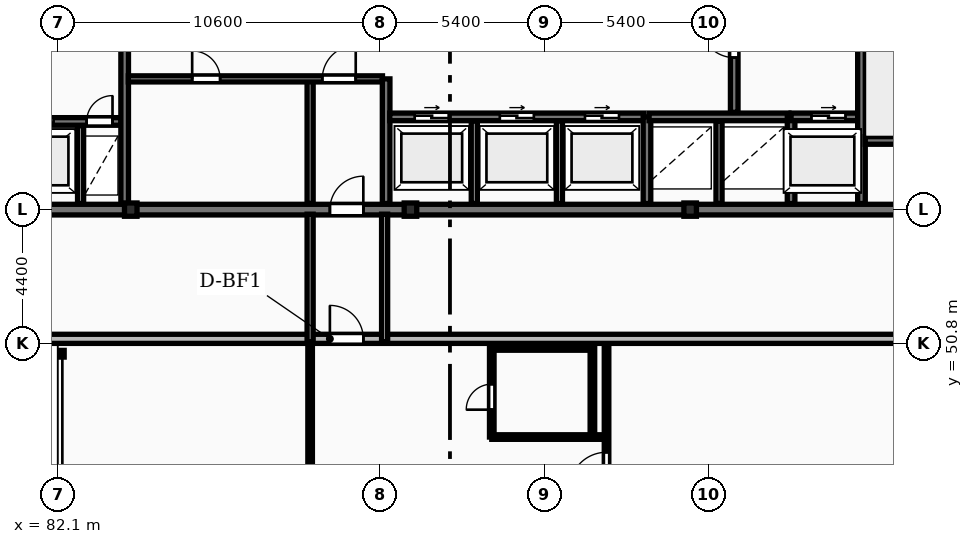
"""IFC4 building model, lengths in metres.
Left out: names, types, materials, properties, quantities, classifications, styles, units other than length and angle.
Written with IfcOpenShell. Run it as: python <this file> out.ifc"""

import sys

from ifc_helpers import new_model, si_unit, direction, frame, frame_2d, origin, origin_2d, place, context, subcontext, project, spatial, rectangle, i_section, extrude, element, fill, save


model = new_model("IFC4")
c1 = context("Model", 3, precision=1e-05, world=origin(), true_north=direction((0.0, 1.0)))
c2 = subcontext(c1, "Body", "Model", "MODEL_VIEW")
j1 = project(units=[si_unit("LENGTHUNIT", "METRE"), si_unit("PLANEANGLEUNIT", "RADIAN")], contexts=[c1])
p1 = place(None, origin())
s1 = spatial("IfcSite", under=j1, at=p1, CompositionType="ELEMENT")
p2 = place(p1, origin())
s2 = spatial("IfcBuilding", under=s1, at=p2, CompositionType="ELEMENT")
p3 = place(p2, frame((0.0, 0.0, 146.5)))
s3 = spatial("IfcBuildingStorey", under=s2, at=p3, CompositionType="ELEMENT", Elevation=146.5)
for number, where, z_axis, x_axis in (
    (1, (84.5, 55.2, 0.0), (0.0, 0.0, 1.0), (1.0, 0.0, 0.0)),
    (2, (93.7, 55.2, 0.0), (0.0, 0.0, 1.0), (1.0, 0.0, 0.0)),
    (3, (102.9, 55.2, 0.0), (0.0, 0.0, 1.0), (1.0, 0.0, 0.0)),
):
    element("IfcColumn", number, at=place(p3, frame(where, z_axis=z_axis, x_axis=x_axis)), inside=s3, PredefinedType="COLUMN", context=c2, shape_type="SweptSolid", body=[
        extrude(i_section(OverallWidth=0.412, OverallDepth=0.437, WebThickness=0.036, FlangeThickness=0.052, FilletRadius=0.015, at=origin_2d()), origin(), (0.0, 0.0, 1.0), 3.6),
    ])
p4 = place(p3, frame((57.6, 50.95, 0.0), z_axis=(0.0, 0.0, 1.0), x_axis=(1.0, 0.0, 0.0)))
e4 = element("IfcWall", 4, at=p4, inside=s3, PredefinedType="STANDARD", context=c2, shape_type="SweptSolid", body=[
    extrude(rectangle(XDim=73.0, YDim=0.3, at=frame_2d((36.5, 0.0))), origin(), (0.0, 0.0, 1.0), 3.31),
])
p5 = place(p4, frame((15.225, 0.0, 0.85)))
e5 = element("IfcOpeningElement", 5, at=p5, cuts=e4, PredefinedType="OPENING", context=c2, shape_type="SweptSolid", body=[
    extrude(rectangle(XDim=1.8, YDim=1.8, at=frame_2d((0.9, 0.9))), frame((0.0, 0.16, 0.0), z_axis=(0.0, -1.0, 0.0), x_axis=(1.0, 0.0, 0.0)), (0.0, 0.0, 1.0), 0.32),
])
p6 = place(p4, frame((58.575, 0.0, 0.85)))
e6 = element("IfcOpeningElement", 6, at=p6, cuts=e4, PredefinedType="OPENING", context=c2, shape_type="SweptSolid", body=[
    extrude(rectangle(XDim=1.8, YDim=1.8, at=frame_2d((0.9, 0.9))), frame((0.0, 0.16, 0.0), z_axis=(0.0, -1.0, 0.0), x_axis=(1.0, 0.0, 0.0)), (0.0, 0.0, 1.0), 0.32),
])
p7 = place(p4, frame((33.45, 0.0, 0.0)))
e7 = element("IfcOpeningElement", 7, at=p7, cuts=e4, PredefinedType="OPENING", context=c2, shape_type="SweptSolid", body=[
    extrude(rectangle(XDim=1.1, YDim=2.1, at=frame_2d((0.55, 1.05))), frame((0.0, 0.16, 0.0), z_axis=(0.0, -1.0, 0.0), x_axis=(1.0, 0.0, 0.0)), (0.0, 0.0, 1.0), 0.32),
])
p8 = place(p3, frame((75.95, 55.2, 0.0), z_axis=(0.0, 0.0, 1.0), x_axis=(1.0, 0.0, 0.0)))
e8 = element("IfcWall", 8, at=p8, inside=s3, PredefinedType="SHEAR", context=c2, shape_type="SweptSolid", body=[
    extrude(rectangle(XDim=36.3, YDim=0.35, at=frame_2d((18.15, 0.0))), origin(), (0.0, 0.0, 1.0), 3.6),
])
p9 = place(p8, frame((15.1, 0.0, 0.0)))
e9 = element("IfcOpeningElement", 9, at=p9, cuts=e8, PredefinedType="OPENING", context=c2, shape_type="SweptSolid", body=[
    extrude(rectangle(XDim=1.1, YDim=2.1, at=frame_2d((0.55, 1.05))), frame((0.0, 0.185, 0.0), z_axis=(0.0, -1.0, 0.0), x_axis=(1.0, 0.0, 0.0)), (0.0, 0.0, 1.0), 0.37),
])
p10 = place(p3, frame((79.79, 58.1, 0.0), z_axis=(0.0, 0.0, 1.0), x_axis=(1.0, 0.0, 0.0)))
e10 = element("IfcWall", 10, at=p10, inside=s3, PredefinedType="SHEAR", context=c2, shape_type="SweptSolid", body=[
    extrude(rectangle(XDim=4.39, YDim=0.25, at=frame_2d((2.195, 0.0))), origin(), (0.0, 0.0, 1.0), 3.6),
])
p11 = place(p10, frame((1.05, 0.0, 0.0)))
e11 = element("IfcOpeningElement", 11, at=p11, cuts=e10, PredefinedType="OPENING", context=c2, shape_type="SweptSolid", body=[
    extrude(rectangle(XDim=1.12, YDim=2.12, at=frame_2d((0.56, 1.06))), frame((0.0, 0.135, 0.0), z_axis=(0.0, -1.0, 0.0), x_axis=(1.0, 0.0, 0.0)), (0.0, 0.0, 1.0), 0.27),
])
p12 = place(p10, frame((3.26, 0.0, 0.0)))
e12 = element("IfcOpeningElement", 12, at=p12, cuts=e10, PredefinedType="OPENING", context=c2, shape_type="SweptSolid", body=[
    extrude(rectangle(XDim=0.85, YDim=2.05, at=frame_2d((0.425, 1.025))), frame((0.0, 0.135, 0.0), z_axis=(0.0, -1.0, 0.0), x_axis=(1.0, 0.0, 0.0)), (0.0, 0.0, 1.0), 0.27),
])
p13 = place(p3, frame((82.85, 55.4, 0.0), z_axis=(0.0, 0.0, 1.0), x_axis=(0.0, 1.0, 0.0)))
e13 = element("IfcWall", 13, at=p13, inside=s3, PredefinedType="PARTITIONING", context=c2, shape_type="SweptSolid", body=[
    extrude(rectangle(XDim=2.56, YDim=0.2, at=frame_2d((1.28, 0.0))), origin(), (0.0, 0.0, 1.0), 3.31),
])
p14 = place(p3, frame((84.3, 55.4, 0.0), z_axis=(0.0, 0.0, 1.0), x_axis=(0.0, 1.0, 0.0)))
e14 = element("IfcWall", 14, at=p14, inside=s3, PredefinedType="SHEAR", context=c2, shape_type="SweptSolid", body=[
    extrude(rectangle(XDim=11.6, YDim=0.25, at=frame_2d((5.8, 0.0))), origin(), (0.0, 0.0, 1.0), 3.6),
])
p15 = place(p14, frame((5.2, 0.0, 0.0)))
e15 = element("IfcOpeningElement", 15, at=p15, cuts=e14, PredefinedType="OPENING", context=c2, shape_type="SweptSolid", body=[
    extrude(rectangle(XDim=1.1, YDim=2.1, at=frame_2d((0.55, 1.05))), frame((0.0, 0.135, 0.0), z_axis=(0.0, -1.0, 0.0), x_axis=(1.0, 0.0, 0.0)), (0.0, 0.0, 1.0), 0.27),
])
p16 = place(p3, frame((90.4, 55.4, 0.0), z_axis=(0.0, 0.0, 1.0), x_axis=(0.0, 1.0, 0.0)))
e16 = element("IfcWall", 16, at=p16, inside=s3, PredefinedType="PARTITIONING", context=c2, shape_type="SweptSolid", body=[
    extrude(rectangle(XDim=4.1, YDim=0.2, at=frame_2d((2.05, 0.0))), origin(), (0.0, 0.0, 1.0), 3.31),
])
p17 = place(p3, frame((84.42, 59.5, 0.0), z_axis=(0.0, 0.0, 1.0), x_axis=(1.0, 0.0, 0.0)))
e17 = element("IfcWall", 17, at=p17, inside=s3, PredefinedType="PARTITIONING", context=c2, shape_type="SweptSolid", body=[
    extrude(rectangle(XDim=8.36, YDim=0.2, at=frame_2d((4.18, 0.0))), origin(), (0.0, 0.0, 1.0), 3.31),
])
p18 = place(p17, frame((2.1, 0.0, 0.0)))
e18 = element("IfcOpeningElement", 18, at=p18, cuts=e17, PredefinedType="OPENING", context=c2, shape_type="SweptSolid", body=[
    extrude(rectangle(XDim=0.92, YDim=2.08, at=frame_2d((0.46, 1.04))), frame((0.0, 0.11, 0.0), z_axis=(0.0, -1.0, 0.0), x_axis=(1.0, 0.0, 0.0)), (0.0, 0.0, 1.0), 0.22),
])
p19 = place(p17, frame((6.38, 0.0, 0.0)))
e19 = element("IfcOpeningElement", 19, at=p19, cuts=e17, PredefinedType="OPENING", context=c2, shape_type="SweptSolid", body=[
    extrude(rectangle(XDim=1.1, YDim=2.1, at=frame_2d((0.55, 1.05))), frame((0.0, 0.11, 0.0), z_axis=(0.0, -1.0, 0.0), x_axis=(1.0, 0.0, 0.0)), (0.0, 0.0, 1.0), 0.22),
])
p20 = place(p3, frame((92.9, 55.4, 0.0), z_axis=(0.0, 0.0, 1.0), x_axis=(0.0, 1.0, 0.0)))
e20 = element("IfcWall", 20, at=p20, inside=s3, PredefinedType="SHEAR", context=c2, shape_type="SweptSolid", body=[
    extrude(rectangle(XDim=4.1, YDim=0.25, at=frame_2d((2.05, 0.0))), origin(), (0.0, 0.0, 1.0), 3.6),
])
for number, where, z_axis, x_axis in (
    (21, (95.8, 55.4, 0.0), (0.0, 0.0, 1.0), (0.0, 1.0, 0.0)),
    (22, (98.6, 55.4, 0.0), (0.0, 0.0, 1.0), (0.0, 1.0, 0.0)),
):
    element("IfcWall", number, at=place(p3, frame(where, z_axis=z_axis, x_axis=x_axis)), inside=s3, PredefinedType="PARTITIONING", context=c2, shape_type="SweptSolid", body=[
        extrude(rectangle(XDim=2.72, YDim=0.2, at=frame_2d((1.36, 0.0))), origin(), (0.0, 0.0, 1.0), 3.31),
    ])
p21 = place(p3, frame((93.02, 58.25, 0.0), z_axis=(0.0, 0.0, 1.0), x_axis=(1.0, 0.0, 0.0)))
e23 = element("IfcWall", 23, at=p21, inside=s3, PredefinedType="SHEAR", context=c2, shape_type="SweptSolid", body=[
    extrude(rectangle(XDim=8.36, YDim=0.25, at=frame_2d((4.18, 0.0))), origin(), (0.0, 0.0, 1.0), 3.6),
])
p22 = place(p21, frame((0.82, 0.0, 0.0)))
e24 = element("IfcOpeningElement", 24, at=p22, cuts=e23, PredefinedType="OPENING", context=c2, shape_type="SweptSolid", body=[
    extrude(rectangle(XDim=1.12, YDim=2.12, at=frame_2d((0.56, 1.06))), frame((0.0, 0.135, 0.0), z_axis=(0.0, -1.0, 0.0), x_axis=(1.0, 0.0, 0.0)), (0.0, 0.0, 1.0), 0.27),
])
p23 = place(p21, frame((3.62, 0.0, 0.0)))
e25 = element("IfcOpeningElement", 25, at=p23, cuts=e23, PredefinedType="OPENING", context=c2, shape_type="SweptSolid", body=[
    extrude(rectangle(XDim=1.12, YDim=2.12, at=frame_2d((0.56, 1.06))), frame((0.0, 0.135, 0.0), z_axis=(0.0, -1.0, 0.0), x_axis=(1.0, 0.0, 0.0)), (0.0, 0.0, 1.0), 0.27),
])
p24 = place(p21, frame((6.42, 0.0, 0.0)))
e26 = element("IfcOpeningElement", 26, at=p24, cuts=e23, PredefinedType="OPENING", context=c2, shape_type="SweptSolid", body=[
    extrude(rectangle(XDim=1.12, YDim=2.12, at=frame_2d((0.56, 1.06))), frame((0.0, 0.135, 0.0), z_axis=(0.0, -1.0, 0.0), x_axis=(1.0, 0.0, 0.0)), (0.0, 0.0, 1.0), 0.27),
])
p25 = place(p3, frame((101.48, 55.4, 0.0), z_axis=(0.0, 0.0, 1.0), x_axis=(0.0, 1.0, 0.0)))
e27 = element("IfcWall", 27, at=p25, inside=s3, PredefinedType="SHEAR", context=c2, shape_type="SweptSolid", body=[
    extrude(rectangle(XDim=2.85, YDim=0.25, at=frame_2d((1.425, 0.0))), origin(), (0.0, 0.0, 1.0), 3.6),
])
p26 = place(p3, frame((103.85, 55.4, 0.0), z_axis=(0.0, 0.0, 1.0), x_axis=(0.0, 1.0, 0.0)))
e28 = element("IfcWall", 28, at=p26, inside=s3, PredefinedType="PARTITIONING", context=c2, shape_type="SweptSolid", body=[
    extrude(rectangle(XDim=2.72, YDim=0.2, at=frame_2d((1.36, 0.0))), origin(), (0.0, 0.0, 1.0), 3.31),
])
p27 = place(p3, frame((101.55, 58.25, 0.0), z_axis=(0.0, 0.0, 1.0), x_axis=(1.0, 0.0, 0.0)))
e29 = element("IfcWall", 29, at=p27, inside=s3, PredefinedType="SHEAR", context=c2, shape_type="SweptSolid", body=[
    extrude(rectangle(XDim=4.6, YDim=0.25, at=frame_2d((2.3, 0.0))), origin(), (0.0, 0.0, 1.0), 3.6),
])
p28 = place(p3, frame((106.22, 55.4, 0.0), z_axis=(0.0, 0.0, 1.0), x_axis=(0.0, 1.0, 0.0)))
e30 = element("IfcWall", 30, at=p28, inside=s3, PredefinedType="SHEAR", context=c2, shape_type="SweptSolid", body=[
    extrude(rectangle(XDim=2.85, YDim=0.25, at=frame_2d((1.425, 0.0))), origin(), (0.0, 0.0, 1.0), 3.6),
])
p29 = place(p3, frame((106.22, 58.25, 0.0), z_axis=(0.0, 0.0, 1.0), x_axis=(1.0, 0.0, 0.0)))
e31 = element("IfcWall", 31, at=p29, inside=s3, PredefinedType="SHEAR", context=c2, shape_type="SweptSolid", body=[
    extrude(rectangle(XDim=2.46, YDim=0.25, at=frame_2d((1.23, 0.0))), origin(), (0.0, 0.0, 1.0), 3.6),
])
p30 = place(p29, frame((0.67, 0.0, 0.0)))
e32 = element("IfcOpeningElement", 32, at=p30, cuts=e31, PredefinedType="OPENING", context=c2, shape_type="SweptSolid", body=[
    extrude(rectangle(XDim=1.12, YDim=2.12, at=frame_2d((0.56, 1.06))), frame((0.0, 0.135, 0.0), z_axis=(0.0, -1.0, 0.0), x_axis=(1.0, 0.0, 0.0)), (0.0, 0.0, 1.0), 0.27),
])
p31 = place(p3, frame((104.35, 58.4, 0.0), z_axis=(0.0, 0.0, 1.0), x_axis=(0.0, 1.0, 0.0)))
e33 = element("IfcWall", 33, at=p31, inside=s3, PredefinedType="SHEAR", context=c2, shape_type="SweptSolid", body=[
    extrude(rectangle(XDim=8.6, YDim=0.25, at=frame_2d((4.3, 0.0))), origin(), (0.0, 0.0, 1.0), 3.6),
])
p32 = place(p31, frame((1.8, 0.0, 0.0)))
e34 = element("IfcOpeningElement", 34, at=p32, cuts=e33, PredefinedType="OPENING", context=c2, shape_type="SweptSolid", body=[
    extrude(rectangle(XDim=1.1, YDim=2.1, at=frame_2d((0.55, 1.05))), frame((0.0, 0.135, 0.0), z_axis=(0.0, -1.0, 0.0), x_axis=(1.0, 0.0, 0.0)), (0.0, 0.0, 1.0), 0.27),
])
p33 = place(p3, frame((108.535, 55.4, 0.0), z_axis=(0.0, 0.0, 1.0), x_axis=(0.0, 1.0, 0.0)))
e35 = element("IfcWall", 35, at=p33, inside=s3, PredefinedType="SHEAR", context=c2, shape_type="SweptSolid", body=[
    extrude(rectangle(XDim=11.6, YDim=0.25, at=frame_2d((5.8, 0.0))), origin(), (0.0, 0.0, 1.0), 3.6),
])
p34 = place(p33, frame((8.2, 0.0, 0.0)))
e36 = element("IfcOpeningElement", 36, at=p34, cuts=e35, PredefinedType="OPENING", context=c2, shape_type="SweptSolid", body=[
    extrude(rectangle(XDim=1.1, YDim=2.1, at=frame_2d((0.55, 1.05))), frame((0.0, 0.135, 0.0), z_axis=(0.0, -1.0, 0.0), x_axis=(1.0, 0.0, 0.0)), (0.0, 0.0, 1.0), 0.27),
])
p35 = place(p33, frame((10.25, 0.0, 0.0)))
e37 = element("IfcOpeningElement", 37, at=p35, cuts=e35, PredefinedType="OPENING", context=c2, shape_type="SweptSolid", body=[
    extrude(rectangle(XDim=0.85, YDim=2.05, at=frame_2d((0.425, 1.025))), frame((0.0, 0.135, 0.0), z_axis=(0.0, -1.0, 0.0), x_axis=(1.0, 0.0, 0.0)), (0.0, 0.0, 1.0), 0.27),
])
p36 = place(p3, frame((108.66, 57.475, 0.0), z_axis=(0.0, 0.0, 1.0), x_axis=(1.0, 0.0, 0.0)))
e38 = element("IfcWall", 38, at=p36, inside=s3, PredefinedType="SHEAR", context=c2, shape_type="SweptSolid", body=[
    extrude(rectangle(XDim=3.24, YDim=0.25, at=frame_2d((1.62, 0.0))), origin(), (0.0, 0.0, 1.0), 3.6),
])
for number, where, z_axis, x_axis in (
    (39, (90.4, 50.85, 0.0), (0.0, 0.0, 1.0), (0.0, 1.0, 0.0)),
    (40, (92.85, 50.85, 0.0), (0.0, 0.0, 1.0), (0.0, 1.0, 0.0)),
):
    element("IfcWall", number, at=place(p3, frame(where, z_axis=z_axis, x_axis=x_axis)), inside=s3, PredefinedType="PARTITIONING", context=c2, shape_type="SweptSolid", body=[
        extrude(rectangle(XDim=4.2, YDim=0.2, at=frame_2d((2.1, 0.0))), origin(), (0.0, 0.0, 1.0), 3.31),
    ])
p37 = place(p3, frame((96.375, 50.65, 0.0), z_axis=(0.0, 0.0, 1.0), x_axis=(1.0, 0.0, 0.0)))
e41 = element("IfcWall", 41, at=p37, inside=s3, PredefinedType="PARTITIONING", context=c2, shape_type="SweptSolid", body=[
    extrude(rectangle(XDim=3.31, YDim=0.15, at=frame_2d((1.655, 0.0))), origin(), (0.0, 0.0, 1.0), 2.69),
])
p38 = place(p3, frame((96.375, 47.72, 0.0), z_axis=(0.0, 0.0, 1.0), x_axis=(0.0, 1.0, 0.0)))
e42 = element("IfcWall", 42, at=p38, inside=s3, PredefinedType="PARTITIONING", context=c2, shape_type="SweptSolid", body=[
    extrude(rectangle(XDim=2.93, YDim=0.15, at=frame_2d((1.465, 0.0))), origin(), (0.0, 0.0, 1.0), 2.383),
])
p39 = place(p38, frame((0.9, 0.0, 0.0)))
e43 = element("IfcOpeningElement", 43, at=p39, cuts=e42, PredefinedType="OPENING", context=c2, shape_type="SweptSolid", body=[
    extrude(rectangle(XDim=0.84, YDim=2.04, at=frame_2d((0.42, 1.02))), frame((0.0, 0.085, 0.0), z_axis=(0.0, -1.0, 0.0), x_axis=(1.0, 0.0, 0.0)), (0.0, 0.0, 1.0), 0.17),
])
p40 = place(p3, frame((96.375, 47.72, 0.0), z_axis=(0.0, 0.0, 1.0), x_axis=(1.0, 0.0, 0.0)))
e44 = element("IfcWall", 44, at=p40, inside=s3, PredefinedType="PARTITIONING", context=c2, shape_type="SweptSolid", body=[
    extrude(rectangle(XDim=3.775, YDim=0.15, at=frame_2d((1.887, 0.0))), origin(), (0.0, 0.0, 1.0), 3.31),
])
p41 = place(p3, frame((99.685, 47.72, 0.0), z_axis=(0.0, 0.0, 1.0), x_axis=(0.0, 1.0, 0.0)))
e45 = element("IfcWall", 45, at=p41, inside=s3, PredefinedType="PARTITIONING", context=c2, shape_type="SweptSolid", body=[
    extrude(rectangle(XDim=2.93, YDim=0.15, at=frame_2d((1.465, 0.0))), origin(), (0.0, 0.0, 1.0), 2.383),
])
p42 = place(p3, frame((90.4, 32.9, 0.0), z_axis=(0.0, 0.0, 1.0), x_axis=(0.0, 1.0, 0.0)))
e46 = element("IfcWall", 46, at=p42, inside=s3, PredefinedType="PARTITIONING", context=c2, shape_type="SweptSolid", body=[
    extrude(rectangle(XDim=17.8, YDim=0.15, at=frame_2d((8.9, 0.0))), origin(), (0.0, 0.0, 1.0), 3.31),
])
p43 = place(p42, frame((8.2, 0.0, 0.0)))
e47 = element("IfcOpeningElement", 47, at=p43, cuts=e46, PredefinedType="OPENING", context=c2, shape_type="SweptSolid", body=[
    extrude(rectangle(XDim=1.22, YDim=2.18, at=frame_2d((0.61, 1.09))), frame((0.0, 0.085, 0.0), z_axis=(0.0, -1.0, 0.0), x_axis=(1.0, 0.0, 0.0)), (0.0, 0.0, 1.0), 0.17),
])
p44 = place(p3, frame((100.15, 32.9, 0.0), z_axis=(0.0, 0.0, 1.0), x_axis=(0.0, 1.0, 0.0)))
e48 = element("IfcWall", 48, at=p44, inside=s3, PredefinedType="PARTITIONING", context=c2, shape_type="SweptSolid", body=[
    extrude(rectangle(XDim=17.8, YDim=0.15, at=frame_2d((8.9, 0.0))), origin(), (0.0, 0.0, 1.0), 3.31),
])
p45 = place(p44, frame((13.1, 0.0, 0.0)))
e49 = element("IfcOpeningElement", 49, at=p45, cuts=e48, PredefinedType="OPENING", context=c2, shape_type="SweptSolid", body=[
    extrude(rectangle(XDim=1.22, YDim=2.18, at=frame_2d((0.61, 1.09))), frame((0.0, 0.085, 0.0), z_axis=(0.0, -1.0, 0.0), x_axis=(1.0, 0.0, 0.0)), (0.0, 0.0, 1.0), 0.17),
])
p46 = place(p7, origin())
e50 = element("IfcDoor", 50, at=p46, inside=s3, OperationType="SINGLE_SWING_LEFT", PredefinedType="DOOR", context=c2, shape_type="SweptSolid", body=[
    extrude(rectangle(XDim=1.1, YDim=2.1, at=frame_2d((0.55, 1.05))), frame((0.0, 0.025, 0.0), z_axis=(0.0, -1.0, 0.0), x_axis=(1.0, 0.0, 0.0)), (0.0, 0.0, 1.0), 0.05),
])
fill(e7, e50)
p47 = place(p9, origin())
e51 = element("IfcDoor", 51, at=p47, inside=s3, OperationType="SINGLE_SWING_RIGHT", PredefinedType="DOOR", context=c2, shape_type="SweptSolid", body=[
    extrude(rectangle(XDim=1.1, YDim=2.1, at=frame_2d((0.55, 1.05))), frame((0.0, 0.025, 0.0), z_axis=(0.0, -1.0, 0.0), x_axis=(1.0, 0.0, 0.0)), (0.0, 0.0, 1.0), 0.05),
])
fill(e9, e51)
p48 = place(p11, origin())
e52 = element("IfcDoor", 52, at=p48, inside=s3, OperationType="SLIDING_TO_LEFT", PredefinedType="DOOR", context=c2, shape_type="SweptSolid", body=[
    extrude(rectangle(XDim=1.12, YDim=2.12, at=frame_2d((0.56, 1.06))), frame((0.0, 0.025, 0.0), z_axis=(0.0, -1.0, 0.0), x_axis=(1.0, 0.0, 0.0)), (0.0, 0.0, 1.0), 0.05),
])
fill(e11, e52)
p49 = place(p12, origin())
e53 = element("IfcDoor", 53, at=p49, inside=s3, OperationType="SINGLE_SWING_RIGHT", PredefinedType="DOOR", context=c2, shape_type="SweptSolid", body=[
    extrude(rectangle(XDim=0.85, YDim=2.05, at=frame_2d((0.425, 1.025))), frame((0.0, 0.025, 0.0), z_axis=(0.0, -1.0, 0.0), x_axis=(1.0, 0.0, 0.0)), (0.0, 0.0, 1.0), 0.05),
])
fill(e12, e53)
p50 = place(p18, origin())
e54 = element("IfcDoor", 54, at=p50, inside=s3, OperationType="SINGLE_SWING_LEFT", PredefinedType="DOOR", context=c2, shape_type="SweptSolid", body=[
    extrude(rectangle(XDim=0.92, YDim=2.08, at=frame_2d((0.46, 1.04))), frame((0.0, 0.025, 0.0), z_axis=(0.0, -1.0, 0.0), x_axis=(1.0, 0.0, 0.0)), (0.0, 0.0, 1.0), 0.05),
])
fill(e18, e54)
p51 = place(p19, origin())
e55 = element("IfcDoor", 55, at=p51, inside=s3, OperationType="SINGLE_SWING_RIGHT", PredefinedType="DOOR", context=c2, shape_type="SweptSolid", body=[
    extrude(rectangle(XDim=1.1, YDim=2.1, at=frame_2d((0.55, 1.05))), frame((0.0, 0.025, 0.0), z_axis=(0.0, -1.0, 0.0), x_axis=(1.0, 0.0, 0.0)), (0.0, 0.0, 1.0), 0.05),
])
fill(e19, e55)
p52 = place(p22, origin())
e56 = element("IfcDoor", 56, at=p52, inside=s3, OperationType="SLIDING_TO_RIGHT", PredefinedType="DOOR", context=c2, shape_type="SweptSolid", body=[
    extrude(rectangle(XDim=1.12, YDim=2.12, at=frame_2d((0.56, 1.06))), frame((0.0, 0.025, 0.0), z_axis=(0.0, -1.0, 0.0), x_axis=(1.0, 0.0, 0.0)), (0.0, 0.0, 1.0), 0.05),
])
fill(e24, e56)
p53 = place(p23, origin())
e57 = element("IfcDoor", 57, at=p53, inside=s3, OperationType="SLIDING_TO_RIGHT", PredefinedType="DOOR", context=c2, shape_type="SweptSolid", body=[
    extrude(rectangle(XDim=1.12, YDim=2.12, at=frame_2d((0.56, 1.06))), frame((0.0, 0.025, 0.0), z_axis=(0.0, -1.0, 0.0), x_axis=(1.0, 0.0, 0.0)), (0.0, 0.0, 1.0), 0.05),
])
fill(e25, e57)
p54 = place(p24, origin())
e58 = element("IfcDoor", 58, at=p54, inside=s3, OperationType="SLIDING_TO_RIGHT", PredefinedType="DOOR", context=c2, shape_type="SweptSolid", body=[
    extrude(rectangle(XDim=1.12, YDim=2.12, at=frame_2d((0.56, 1.06))), frame((0.0, 0.025, 0.0), z_axis=(0.0, -1.0, 0.0), x_axis=(1.0, 0.0, 0.0)), (0.0, 0.0, 1.0), 0.05),
])
fill(e26, e58)
p55 = place(p30, origin())
e59 = element("IfcDoor", 59, at=p55, inside=s3, OperationType="SLIDING_TO_RIGHT", PredefinedType="DOOR", context=c2, shape_type="SweptSolid", body=[
    extrude(rectangle(XDim=1.12, YDim=2.12, at=frame_2d((0.56, 1.06))), frame((0.0, 0.025, 0.0), z_axis=(0.0, -1.0, 0.0), x_axis=(1.0, 0.0, 0.0)), (0.0, 0.0, 1.0), 0.05),
])
fill(e32, e59)
p56 = place(p32, origin())
e60 = element("IfcDoor", 60, at=p56, inside=s3, OperationType="SINGLE_SWING_RIGHT", PredefinedType="DOOR", context=c2, shape_type="SweptSolid", body=[
    extrude(rectangle(XDim=1.1, YDim=2.1, at=frame_2d((0.55, 1.05))), frame((0.0, 0.025, 0.0), z_axis=(0.0, -1.0, 0.0), x_axis=(1.0, 0.0, 0.0)), (0.0, 0.0, 1.0), 0.05),
])
fill(e34, e60)
p57 = place(p39, origin())
e61 = element("IfcDoor", 61, at=p57, inside=s3, OperationType="SINGLE_SWING_LEFT", PredefinedType="DOOR", context=c2, shape_type="SweptSolid", body=[
    extrude(rectangle(XDim=0.84, YDim=2.04, at=frame_2d((0.42, 1.02))), frame((0.0, 0.025, 0.0), z_axis=(0.0, -1.0, 0.0), x_axis=(1.0, 0.0, 0.0)), (0.0, 0.0, 1.0), 0.05),
])
fill(e43, e61)
p58 = place(p45, origin())
e62 = element("IfcDoor", 62, at=p58, inside=s3, OperationType="SINGLE_SWING_LEFT", PredefinedType="DOOR", context=c2, shape_type="SweptSolid", body=[
    extrude(rectangle(XDim=1.22, YDim=2.18, at=frame_2d((0.61, 1.09))), frame((0.0, 0.025, 0.0), z_axis=(0.0, -1.0, 0.0), x_axis=(1.0, 0.0, 0.0)), (0.0, 0.0, 1.0), 0.05),
])
fill(e49, e62)
save(model, sys.argv[1])
